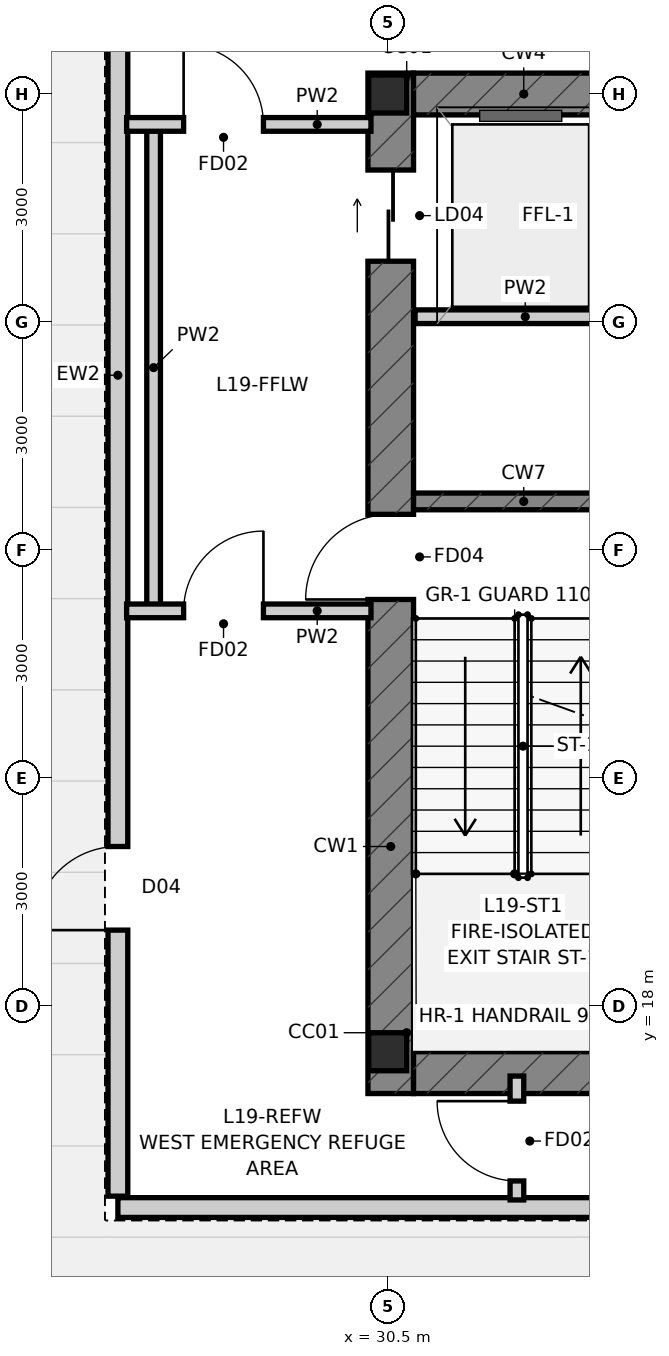
"""IFC4 building model, lengths in metres.
Left out: names, types, materials, properties, quantities, classifications, styles, units other than length and angle.
Written with IfcOpenShell. Run it as: python <this file> out.ifc"""

import sys

from ifc_helpers import new_model, si_unit, direction, frame, frame_2d, origin, origin_2d, place, context, subcontext, project, spatial, rectangle, i_section, extrude, source, transform, mapped, element, fill, save


model = new_model("IFC4")
c1 = context("Model", 3, precision=1e-05, world=origin(), true_north=direction((0.0, 1.0)))
c2 = subcontext(c1, "Body", "Model", "MODEL_VIEW")
j1 = project(units=[si_unit("LENGTHUNIT", "METRE"), si_unit("PLANEANGLEUNIT", "RADIAN")], contexts=[c1])
p1 = place(None, origin())
s1 = spatial("IfcSite", under=j1, at=p1, CompositionType="ELEMENT")
p2 = place(p1, origin())
s2 = spatial("IfcBuilding", under=s1, at=p2, CompositionType="ELEMENT")
p3 = place(p2, frame((0.0, 0.0, 75.05)))
s3 = spatial("IfcBuildingStorey", under=s2, at=p3, CompositionType="ELEMENT", Elevation=75.05)
m1 = source(origin(), c2, "Body", "SweptSolid", [
    extrude(i_section(OverallWidth=0.5, OverallDepth=0.5, WebThickness=0.028, FlangeThickness=0.04, at=origin_2d()), origin(), (0.0, 0.0, 1.0), 4.8),
])
for number, where, z_axis, x_axis in (
    (1, (30.5, 17.4, 0.0), (0.0, 0.0, 1.0), (1.0, 0.0, 0.0)),
    (2, (30.5, 30.0, 0.0), (0.0, 0.0, 1.0), (1.0, 0.0, 0.0)),
):
    element("IfcColumn", number, at=place(p3, frame(where, z_axis=z_axis, x_axis=x_axis)), inside=s3, PredefinedType="COLUMN", context=c2, shape_type="MappedRepresentation", body=[
        mapped(m1, transform((0.0, 0.0, 0.0), scale=1.0)),
    ])
p4 = place(p3, frame((30.54, 16.85, 0.0), z_axis=(0.0, 0.0, 1.0), x_axis=(0.0, 1.0, 0.0)))
e3 = element("IfcWall", 3, at=p4, inside=s3, PredefinedType="SHEAR", context=c2, shape_type="SweptSolid", body=[
    extrude(rectangle(XDim=13.425, YDim=0.6, at=frame_2d((6.712, 0.0))), origin(), (0.0, 0.0, 1.0), 4.8),
])
p5 = place(p4, frame((6.5, 0.0, 0.0)))
e4 = element("IfcOpeningElement", 4, at=p5, cuts=e3, PredefinedType="OPENING", context=c2, shape_type="SweptSolid", body=[
    extrude(rectangle(XDim=1.12, YDim=2.15, at=frame_2d((0.56, 1.075))), frame((0.0, 0.312, 0.0), z_axis=(0.0, -1.0, 0.0), x_axis=(1.0, 0.0, 0.0)), (0.0, 0.0, 1.0), 0.624),
])
p6 = place(p4, frame((10.95, 0.0, 0.0)))
e5 = element("IfcOpeningElement", 5, at=p6, cuts=e3, PredefinedType="OPENING", context=c2, shape_type="SweptSolid", body=[
    extrude(rectangle(XDim=1.2, YDim=2.2, at=frame_2d((0.6, 1.1))), frame((0.0, 0.312, 0.0), z_axis=(0.0, -1.0, 0.0), x_axis=(1.0, 0.0, 0.0)), (0.0, 0.0, 1.0), 0.624),
])
for number, where, z_axis, x_axis in (
    (6, (30.84, 17.125, 0.0), (0.0, 0.0, 1.0), (1.0, 0.0, 0.0)),
    (7, (30.84, 30.0, 0.0), (0.0, 0.0, 1.0), (1.0, 0.0, 0.0)),
):
    element("IfcWall", number, at=place(p3, frame(where, z_axis=z_axis, x_axis=x_axis)), inside=s3, PredefinedType="SHEAR", context=c2, shape_type="SweptSolid", body=[
        extrude(rectangle(XDim=2.9, YDim=0.55, at=frame_2d((1.45, 0.0))), origin(), (0.0, 0.0, 1.0), 4.8),
    ])
p7 = place(p3, frame((30.84, 24.64, 0.0), z_axis=(0.0, 0.0, 1.0), x_axis=(1.0, 0.0, 0.0)))
e8 = element("IfcWall", 8, at=p7, inside=s3, PredefinedType="SHEAR", context=c2, shape_type="SweptSolid", body=[
    extrude(rectangle(XDim=2.9, YDim=0.22, at=frame_2d((1.45, 0.0))), origin(), (0.0, 0.0, 1.0), 4.8),
])
p8 = place(p3, frame((26.95, 15.35, 0.0), z_axis=(0.0, 0.0, 1.0), x_axis=(1.0, 0.0, 0.0)))
e9 = element("IfcWall", 9, at=p8, inside=s3, PredefinedType="STANDARD", context=c2, shape_type="SweptSolid", body=[
    extrude(rectangle(XDim=22.1, YDim=0.26, at=frame_2d((11.05, 0.0))), origin(), (0.0, 0.0, 1.0), 4.176),
])
p9 = place(p3, frame((26.95, 15.5, 0.0), z_axis=(0.0, 0.0, 1.0), x_axis=(0.0, 1.0, 0.0)))
e10 = element("IfcWall", 10, at=p9, inside=s3, PredefinedType="STANDARD", context=c2, shape_type="SweptSolid", body=[
    extrude(rectangle(XDim=17.0, YDim=0.26, at=frame_2d((8.5, 0.0))), origin(), (0.0, 0.0, 1.0), 4.176),
])
p10 = place(p9, frame((3.5, 0.0, 0.0)))
e11 = element("IfcOpeningElement", 11, at=p10, cuts=e10, PredefinedType="OPENING", context=c2, shape_type="SweptSolid", body=[
    extrude(rectangle(XDim=1.1, YDim=2.2, at=frame_2d((0.55, 1.1))), frame((0.0, 0.142, 0.0), z_axis=(0.0, -1.0, 0.0), x_axis=(1.0, 0.0, 0.0)), (0.0, 0.0, 1.0), 0.284),
])
p11 = place(p3, frame((27.42, 23.2, 0.0), z_axis=(0.0, 0.0, 1.0), x_axis=(0.0, 1.0, 0.0)))
e12 = element("IfcWall", 12, at=p11, inside=s3, PredefinedType="PARTITIONING", context=c2, shape_type="SweptSolid", body=[
    extrude(rectangle(XDim=6.4, YDim=0.18, at=frame_2d((3.2, 0.0))), origin(), (0.0, 0.0, 1.0), 4.176),
])
p12 = place(p3, frame((27.065, 23.2, 0.0), z_axis=(0.0, 0.0, 1.0), x_axis=(1.0, 0.0, 0.0)))
e13 = element("IfcWall", 13, at=p12, inside=s3, PredefinedType="PARTITIONING", context=c2, shape_type="SweptSolid", body=[
    extrude(rectangle(XDim=3.215, YDim=0.18, at=frame_2d((1.607, 0.0))), origin(), (0.0, 0.0, 1.0), 4.55),
])
p13 = place(p12, frame((0.75, 0.0, 0.0)))
e14 = element("IfcOpeningElement", 14, at=p13, cuts=e13, PredefinedType="OPENING", context=c2, shape_type="SweptSolid", body=[
    extrude(rectangle(XDim=1.05, YDim=2.15, at=frame_2d((0.525, 1.075))), frame((0.0, 0.102, 0.0), z_axis=(0.0, -1.0, 0.0), x_axis=(1.0, 0.0, 0.0)), (0.0, 0.0, 1.0), 0.204),
])
p14 = place(p3, frame((27.065, 29.6, 0.0), z_axis=(0.0, 0.0, 1.0), x_axis=(1.0, 0.0, 0.0)))
e15 = element("IfcWall", 15, at=p14, inside=s3, PredefinedType="PARTITIONING", context=c2, shape_type="SweptSolid", body=[
    extrude(rectangle(XDim=3.215, YDim=0.18, at=frame_2d((1.607, 0.0))), origin(), (0.0, 0.0, 1.0), 3.933),
])
p15 = place(p14, frame((0.75, 0.0, 0.0)))
e16 = element("IfcOpeningElement", 16, at=p15, cuts=e15, PredefinedType="OPENING", context=c2, shape_type="SweptSolid", body=[
    extrude(rectangle(XDim=1.05, YDim=2.15, at=frame_2d((0.525, 1.075))), frame((0.0, 0.102, 0.0), z_axis=(0.0, -1.0, 0.0), x_axis=(1.0, 0.0, 0.0)), (0.0, 0.0, 1.0), 0.204),
])
p16 = place(p3, frame((30.86, 27.07, 0.0), z_axis=(0.0, 0.0, 1.0), x_axis=(1.0, 0.0, 0.0)))
e17 = element("IfcWall", 17, at=p16, inside=s3, PredefinedType="PARTITIONING", context=c2, shape_type="SweptSolid", body=[
    extrude(rectangle(XDim=2.9, YDim=0.18, at=frame_2d((1.45, 0.0))), origin(), (0.0, 0.0, 1.0), 4.55),
])
p17 = place(p3, frame((32.2, 15.45, 0.0), z_axis=(0.0, 0.0, 1.0), x_axis=(0.0, 1.0, 0.0)))
e18 = element("IfcWall", 18, at=p17, inside=s3, PredefinedType="PARTITIONING", context=c2, shape_type="SweptSolid", body=[
    extrude(rectangle(XDim=1.63, YDim=0.18, at=frame_2d((0.815, 0.0))), origin(), (0.0, 0.0, 1.0), 4.55),
])
p18 = place(p17, frame((0.25, 0.0, 0.0)))
e19 = element("IfcOpeningElement", 19, at=p18, cuts=e18, PredefinedType="OPENING", context=c2, shape_type="SweptSolid", body=[
    extrude(rectangle(XDim=1.05, YDim=2.15, at=frame_2d((0.525, 1.075))), frame((0.0, 0.102, 0.0), z_axis=(0.0, -1.0, 0.0), x_axis=(1.0, 0.0, 0.0)), (0.0, 0.0, 1.0), 0.204),
])
p19 = place(p10, origin())
e20 = element("IfcDoor", 20, at=p19, inside=s3, OperationType="SINGLE_SWING_LEFT", PredefinedType="DOOR", context=c2, shape_type="SweptSolid", body=[
    extrude(rectangle(XDim=1.1, YDim=2.2, at=frame_2d((0.55, 1.1))), frame((0.0, 0.025, 0.0), z_axis=(0.0, -1.0, 0.0), x_axis=(1.0, 0.0, 0.0)), (0.0, 0.0, 1.0), 0.05),
])
fill(e11, e20)
p20 = place(p5, origin())
e21 = element("IfcDoor", 21, at=p20, inside=s3, OperationType="SINGLE_SWING_LEFT", PredefinedType="DOOR", context=c2, shape_type="SweptSolid", body=[
    extrude(rectangle(XDim=1.12, YDim=2.15, at=frame_2d((0.56, 1.075))), frame((0.0, 0.025, 0.0), z_axis=(0.0, -1.0, 0.0), x_axis=(1.0, 0.0, 0.0)), (0.0, 0.0, 1.0), 0.05),
])
fill(e4, e21)
p21 = place(p6, origin())
e22 = element("IfcDoor", 22, at=p21, inside=s3, OperationType="SLIDING_TO_LEFT", PredefinedType="DOOR", context=c2, shape_type="SweptSolid", body=[
    extrude(rectangle(XDim=1.2, YDim=2.2, at=frame_2d((0.6, 1.1))), frame((0.0, 0.025, 0.0), z_axis=(0.0, -1.0, 0.0), x_axis=(1.0, 0.0, 0.0)), (0.0, 0.0, 1.0), 0.05),
])
fill(e5, e22)
p22 = place(p13, origin())
e23 = element("IfcDoor", 23, at=p22, inside=s3, OperationType="SINGLE_SWING_RIGHT", PredefinedType="DOOR", context=c2, shape_type="SweptSolid", body=[
    extrude(rectangle(XDim=1.05, YDim=2.15, at=frame_2d((0.525, 1.075))), frame((0.0, 0.025, 0.0), z_axis=(0.0, -1.0, 0.0), x_axis=(1.0, 0.0, 0.0)), (0.0, 0.0, 1.0), 0.05),
])
fill(e14, e23)
p23 = place(p15, origin())
e24 = element("IfcDoor", 24, at=p23, inside=s3, OperationType="SINGLE_SWING_LEFT", PredefinedType="DOOR", context=c2, shape_type="SweptSolid", body=[
    extrude(rectangle(XDim=1.05, YDim=2.15, at=frame_2d((0.525, 1.075))), frame((0.0, 0.025, 0.0), z_axis=(0.0, -1.0, 0.0), x_axis=(1.0, 0.0, 0.0)), (0.0, 0.0, 1.0), 0.05),
])
fill(e16, e24)
p24 = place(p18, origin())
e25 = element("IfcDoor", 25, at=p24, inside=s3, OperationType="SINGLE_SWING_RIGHT", PredefinedType="DOOR", context=c2, shape_type="SweptSolid", body=[
    extrude(rectangle(XDim=1.05, YDim=2.15, at=frame_2d((0.525, 1.075))), frame((0.0, 0.025, 0.0), z_axis=(0.0, -1.0, 0.0), x_axis=(1.0, 0.0, 0.0)), (0.0, 0.0, 1.0), 0.05),
])
fill(e19, e25)
save(model, sys.argv[1])
